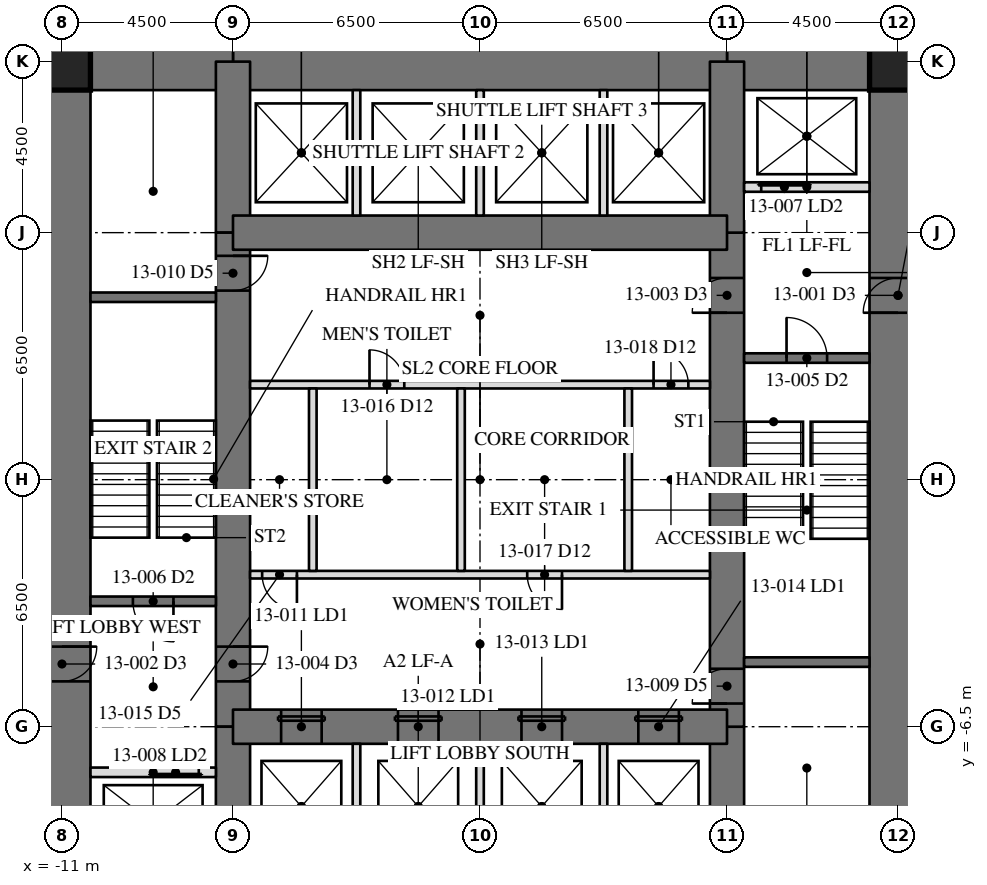
"""IFC4 building model, lengths in metres.
Left out: names, types, materials, properties, quantities, classifications, styles, units other than length and angle.
Written with IfcOpenShell. Run it as: python <this file> out.ifc"""

import sys

from ifc_helpers import new_model, si_unit, direction, frame, frame_2d, origin, origin_2d, place, context, subcontext, project, spatial, rectangle, hollow_rectangle, extrude, element, fill, save


model = new_model("IFC4")
c1 = context("Model", 3, precision=1e-05, world=origin(), true_north=direction((0.0, 1.0)))
c2 = subcontext(c1, "Body", "Model", "MODEL_VIEW")
j1 = project(units=[si_unit("LENGTHUNIT", "METRE"), si_unit("PLANEANGLEUNIT", "RADIAN")], contexts=[c1])
p1 = place(None, origin())
s1 = spatial("IfcSite", under=j1, at=p1, CompositionType="ELEMENT")
p2 = place(p1, origin())
s2 = spatial("IfcBuilding", under=s1, at=p2, CompositionType="ELEMENT")
p3 = place(p2, frame((0.0, 0.0, 57.0)))
s3 = spatial("IfcBuildingStorey", under=s2, at=p3, CompositionType="ELEMENT", Elevation=57.0)
p4 = place(p3, frame((11.0, -11.0, 0.0), z_axis=(0.0, 0.0, 1.0), x_axis=(0.0, 1.0, 0.0)))
e1 = element("IfcWall", 1, at=p4, inside=s3, PredefinedType="SHEAR", context=c2, shape_type="SweptSolid", body=[
    extrude(rectangle(XDim=22.0, YDim=1.5, at=frame_2d((11.0, 0.0))), origin(), (0.0, 0.0, 1.0), 4.1),
])
p5 = place(p4, frame((15.393, 0.0, 0.0)))
e2 = element("IfcOpeningElement", 2, at=p5, cuts=e1, PredefinedType="OPENING", context=c2, shape_type="SweptSolid", body=[
    extrude(rectangle(XDim=0.915, YDim=2.134, at=frame_2d((0.458, 1.067))), frame((0.0, 0.76, 0.0), z_axis=(0.0, -1.0, 0.0), x_axis=(1.0, 0.0, 0.0)), (0.0, 0.0, 1.0), 1.52),
])
p6 = place(p3, frame((-11.0, 11.0, 0.0), z_axis=(0.0, 0.0, 1.0), x_axis=(0.0, -1.0, 0.0)))
e3 = element("IfcWall", 3, at=p6, inside=s3, PredefinedType="SHEAR", context=c2, shape_type="SweptSolid", body=[
    extrude(rectangle(XDim=22.0, YDim=1.5, at=frame_2d((11.0, 0.0))), origin(), (0.0, 0.0, 1.0), 4.1),
])
p7 = place(p6, frame((15.393, 0.0, 0.0)))
e4 = element("IfcOpeningElement", 4, at=p7, cuts=e3, PredefinedType="OPENING", context=c2, shape_type="SweptSolid", body=[
    extrude(rectangle(XDim=0.915, YDim=2.134, at=frame_2d((0.458, 1.067))), frame((0.0, 0.76, 0.0), z_axis=(0.0, -1.0, 0.0), x_axis=(1.0, 0.0, 0.0)), (0.0, 0.0, 1.0), 1.52),
])
p8 = place(p3, frame((11.0, 11.0, 0.0), z_axis=(0.0, 0.0, 1.0), x_axis=(-1.0, 0.0, 0.0)))
e5 = element("IfcWall", 5, at=p8, inside=s3, PredefinedType="SHEAR", context=c2, shape_type="SweptSolid", body=[
    extrude(rectangle(XDim=4.5, YDim=1.5, at=frame_2d((2.25, 0.0))), origin(), (0.0, 0.0, 1.0), 4.1),
])
p9 = place(p3, frame((6.5, 11.0, 0.0), z_axis=(0.0, 0.0, 1.0), x_axis=(-1.0, 0.0, 0.0)))
e6 = element("IfcWall", 6, at=p9, inside=s3, PredefinedType="SHEAR", context=c2, shape_type="SweptSolid", body=[
    extrude(rectangle(XDim=13.0, YDim=1.5, at=frame_2d((6.5, 0.0))), origin(), (0.0, 0.0, 1.0), 4.1),
])
p10 = place(p3, frame((-6.5, 11.0, 0.0), z_axis=(0.0, 0.0, 1.0), x_axis=(-1.0, 0.0, 0.0)))
e7 = element("IfcWall", 7, at=p10, inside=s3, PredefinedType="SHEAR", context=c2, shape_type="SweptSolid", body=[
    extrude(rectangle(XDim=4.5, YDim=1.5, at=frame_2d((2.25, 0.0))), origin(), (0.0, 0.0, 1.0), 4.1),
])
p11 = place(p3, frame((6.5, -11.0, 0.0), z_axis=(0.0, 0.0, 1.0), x_axis=(0.0, 1.0, 0.0)))
e8 = element("IfcWall", 8, at=p11, inside=s3, PredefinedType="SHEAR", context=c2, shape_type="SweptSolid", body=[
    extrude(rectangle(XDim=4.5, YDim=0.9, at=frame_2d((2.25, 0.0))), origin(), (0.0, 0.0, 1.0), 4.1),
])
p12 = place(p3, frame((6.5, -6.5, 0.0), z_axis=(0.0, 0.0, 1.0), x_axis=(0.0, 1.0, 0.0)))
e9 = element("IfcWall", 9, at=p12, inside=s3, PredefinedType="SHEAR", context=c2, shape_type="SweptSolid", body=[
    extrude(rectangle(XDim=13.0, YDim=0.9, at=frame_2d((6.5, 0.0))), origin(), (0.0, 0.0, 1.0), 4.1),
])
p13 = place(p12, frame((10.893, 0.0, 0.0)))
e10 = element("IfcOpeningElement", 10, at=p13, cuts=e9, PredefinedType="OPENING", context=c2, shape_type="SweptSolid", body=[
    extrude(rectangle(XDim=0.915, YDim=2.134, at=frame_2d((0.458, 1.067))), frame((0.0, 0.46, 0.0), z_axis=(0.0, -1.0, 0.0), x_axis=(1.0, 0.0, 0.0)), (0.0, 0.0, 1.0), 0.92),
])
p14 = place(p12, frame((0.61, 0.0, 0.0)))
e11 = element("IfcOpeningElement", 11, at=p14, cuts=e9, PredefinedType="OPENING", context=c2, shape_type="SweptSolid", body=[
    extrude(rectangle(XDim=0.915, YDim=2.134, at=frame_2d((0.458, 1.067))), frame((0.0, 0.46, 0.0), z_axis=(0.0, -1.0, 0.0), x_axis=(1.0, 0.0, 0.0)), (0.0, 0.0, 1.0), 0.92),
])
for number, where, z_axis, x_axis in (
    (12, (6.5, 6.5, 0.0), (0.0, 0.0, 1.0), (0.0, 1.0, 0.0)),
    (13, (-6.5, 11.0, 0.0), (0.0, 0.0, 1.0), (0.0, -1.0, 0.0)),
):
    element("IfcWall", number, at=place(p3, frame(where, z_axis=z_axis, x_axis=x_axis)), inside=s3, PredefinedType="SHEAR", context=c2, shape_type="SweptSolid", body=[
        extrude(rectangle(XDim=4.5, YDim=0.9, at=frame_2d((2.25, 0.0))), origin(), (0.0, 0.0, 1.0), 4.1),
    ])
p15 = place(p3, frame((-6.5, 6.5, 0.0), z_axis=(0.0, 0.0, 1.0), x_axis=(0.0, -1.0, 0.0)))
e14 = element("IfcWall", 14, at=p15, inside=s3, PredefinedType="SHEAR", context=c2, shape_type="SweptSolid", body=[
    extrude(rectangle(XDim=13.0, YDim=0.9, at=frame_2d((6.5, 0.0))), origin(), (0.0, 0.0, 1.0), 4.1),
])
p16 = place(p15, frame((10.893, 0.0, 0.0)))
e15 = element("IfcOpeningElement", 15, at=p16, cuts=e14, PredefinedType="OPENING", context=c2, shape_type="SweptSolid", body=[
    extrude(rectangle(XDim=0.915, YDim=2.134, at=frame_2d((0.458, 1.067))), frame((0.0, 0.46, 0.0), z_axis=(0.0, -1.0, 0.0), x_axis=(1.0, 0.0, 0.0)), (0.0, 0.0, 1.0), 0.92),
])
p17 = place(p15, frame((0.61, 0.0, 0.0)))
e16 = element("IfcOpeningElement", 16, at=p17, cuts=e14, PredefinedType="OPENING", context=c2, shape_type="SweptSolid", body=[
    extrude(rectangle(XDim=0.915, YDim=2.134, at=frame_2d((0.458, 1.067))), frame((0.0, 0.46, 0.0), z_axis=(0.0, -1.0, 0.0), x_axis=(1.0, 0.0, 0.0)), (0.0, 0.0, 1.0), 0.92),
])
p18 = place(p3, frame((-6.5, -6.5, 0.0), z_axis=(0.0, 0.0, 1.0), x_axis=(0.0, -1.0, 0.0)))
e17 = element("IfcWall", 17, at=p18, inside=s3, PredefinedType="SHEAR", context=c2, shape_type="SweptSolid", body=[
    extrude(rectangle(XDim=4.5, YDim=0.9, at=frame_2d((2.25, 0.0))), origin(), (0.0, 0.0, 1.0), 4.1),
])
p19 = place(p3, frame((6.5, 6.5, 0.0), z_axis=(0.0, 0.0, 1.0), x_axis=(-1.0, 0.0, 0.0)))
e18 = element("IfcWall", 18, at=p19, inside=s3, PredefinedType="SHEAR", context=c2, shape_type="SweptSolid", body=[
    extrude(rectangle(XDim=13.0, YDim=0.9, at=frame_2d((6.5, 0.0))), origin(), (0.0, 0.0, 1.0), 4.1),
])
p20 = place(p3, frame((-6.5, -6.5, 0.0), z_axis=(0.0, 0.0, 1.0), x_axis=(1.0, 0.0, 0.0)))
e19 = element("IfcWall", 19, at=p20, inside=s3, PredefinedType="SHEAR", context=c2, shape_type="SweptSolid", body=[
    extrude(rectangle(XDim=13.0, YDim=0.9, at=frame_2d((6.5, 0.0))), origin(), (0.0, 0.0, 1.0), 4.1),
])
p21 = place(p20, frame((1.267, 0.0, 0.0)))
e20 = element("IfcOpeningElement", 20, at=p21, cuts=e19, PredefinedType="OPENING", context=c2, shape_type="SweptSolid", body=[
    extrude(rectangle(XDim=1.067, YDim=2.134, at=frame_2d((0.533, 1.067))), frame((0.0, 0.46, 0.0), z_axis=(0.0, -1.0, 0.0), x_axis=(1.0, 0.0, 0.0)), (0.0, 0.0, 1.0), 0.92),
])
p22 = place(p20, frame((4.342, 0.0, 0.0)))
e21 = element("IfcOpeningElement", 21, at=p22, cuts=e19, PredefinedType="OPENING", context=c2, shape_type="SweptSolid", body=[
    extrude(rectangle(XDim=1.067, YDim=2.134, at=frame_2d((0.533, 1.067))), frame((0.0, 0.46, 0.0), z_axis=(0.0, -1.0, 0.0), x_axis=(1.0, 0.0, 0.0)), (0.0, 0.0, 1.0), 0.92),
])
p23 = place(p20, frame((7.592, 0.0, 0.0)))
e22 = element("IfcOpeningElement", 22, at=p23, cuts=e19, PredefinedType="OPENING", context=c2, shape_type="SweptSolid", body=[
    extrude(rectangle(XDim=1.067, YDim=2.134, at=frame_2d((0.533, 1.067))), frame((0.0, 0.46, 0.0), z_axis=(0.0, -1.0, 0.0), x_axis=(1.0, 0.0, 0.0)), (0.0, 0.0, 1.0), 0.92),
])
p24 = place(p20, frame((10.667, 0.0, 0.0)))
e23 = element("IfcOpeningElement", 23, at=p24, cuts=e19, PredefinedType="OPENING", context=c2, shape_type="SweptSolid", body=[
    extrude(rectangle(XDim=1.067, YDim=2.134, at=frame_2d((0.533, 1.067))), frame((0.0, 0.46, 0.0), z_axis=(0.0, -1.0, 0.0), x_axis=(1.0, 0.0, 0.0)), (0.0, 0.0, 1.0), 0.92),
])
for number, where, z_axis, x_axis in (
    (24, (11.0, 11.0, 0.0), (0.0, 0.0, 1.0), (1.0, 0.0, 0.0)),
    (25, (-11.0, 11.0, 0.0), (0.0, 0.0, 1.0), (1.0, 0.0, 0.0)),
):
    element("IfcColumn", number, at=place(p3, frame(where, z_axis=z_axis, x_axis=x_axis)), inside=s3, PredefinedType="COLUMN", context=c2, shape_type="SweptSolid", body=[
        extrude(hollow_rectangle(XDim=1.499, YDim=1.499, WallThickness=0.102, at=origin_2d()), origin(), (0.0, 0.0, 1.0), 4.1),
    ])
for number, where, z_axis, x_axis in (
    (26, (6.95, -4.8, 0.0), (0.0, 0.0, 1.0), (1.0, 0.0, 0.0)),
    (27, (-6.95, 4.8, 0.0), (0.0, 0.0, 1.0), (-1.0, 0.0, 0.0)),
):
    element("IfcWall", number, at=place(p3, frame(where, z_axis=z_axis, x_axis=x_axis)), inside=s3, PredefinedType="SOLIDWALL", context=c2, shape_type="SweptSolid", body=[
        extrude(rectangle(XDim=3.3, YDim=0.25, at=frame_2d((1.65, 0.0))), origin(), (0.0, 0.0, 1.0), 3.91),
    ])
p25 = place(p3, frame((6.95, 3.2, 0.0), z_axis=(0.0, 0.0, 1.0), x_axis=(1.0, 0.0, 0.0)))
e28 = element("IfcWall", 28, at=p25, inside=s3, PredefinedType="SOLIDWALL", context=c2, shape_type="SweptSolid", body=[
    extrude(rectangle(XDim=3.3, YDim=0.25, at=frame_2d((1.65, 0.0))), origin(), (0.0, 0.0, 1.0), 3.91),
])
p26 = place(p25, frame((1.116, 0.0, 0.0)))
e29 = element("IfcOpeningElement", 29, at=p26, cuts=e28, PredefinedType="OPENING", context=c2, shape_type="SweptSolid", body=[
    extrude(rectangle(XDim=1.067, YDim=2.134, at=frame_2d((0.533, 1.067))), frame((0.0, 0.135, 0.0), z_axis=(0.0, -1.0, 0.0), x_axis=(1.0, 0.0, 0.0)), (0.0, 0.0, 1.0), 0.27),
])
p27 = place(p3, frame((-6.95, -3.2, 0.0), z_axis=(0.0, 0.0, 1.0), x_axis=(-1.0, 0.0, 0.0)))
e30 = element("IfcWall", 30, at=p27, inside=s3, PredefinedType="SOLIDWALL", context=c2, shape_type="SweptSolid", body=[
    extrude(rectangle(XDim=3.3, YDim=0.25, at=frame_2d((1.65, 0.0))), origin(), (0.0, 0.0, 1.0), 3.91),
])
p28 = place(p27, frame((1.116, 0.0, 0.0)))
e31 = element("IfcOpeningElement", 31, at=p28, cuts=e30, PredefinedType="OPENING", context=c2, shape_type="SweptSolid", body=[
    extrude(rectangle(XDim=1.067, YDim=2.134, at=frame_2d((0.533, 1.067))), frame((0.0, 0.135, 0.0), z_axis=(0.0, -1.0, 0.0), x_axis=(1.0, 0.0, 0.0)), (0.0, 0.0, 1.0), 0.27),
])
p29 = place(p3, frame((6.95, 7.7, 0.0), z_axis=(0.0, 0.0, 1.0), x_axis=(1.0, 0.0, 0.0)))
e32 = element("IfcWall", 32, at=p29, inside=s3, PredefinedType="PARTITIONING", context=c2, shape_type="SweptSolid", body=[
    extrude(rectangle(XDim=3.3, YDim=0.25, at=frame_2d((1.65, 0.0))), origin(), (0.0, 0.0, 1.0), 3.91),
])
p30 = place(p29, frame((0.45, 0.0, 0.0)))
e33 = element("IfcOpeningElement", 33, at=p30, cuts=e32, PredefinedType="OPENING", context=c2, shape_type="SweptSolid", body=[
    extrude(rectangle(XDim=1.219, YDim=2.134, at=frame_2d((0.609, 1.067))), frame((0.0, 0.135, 0.0), z_axis=(0.0, -1.0, 0.0), x_axis=(1.0, 0.0, 0.0)), (0.0, 0.0, 1.0), 0.27),
])
p31 = place(p3, frame((-6.95, -7.7, 0.0), z_axis=(0.0, 0.0, 1.0), x_axis=(-1.0, 0.0, 0.0)))
e34 = element("IfcWall", 34, at=p31, inside=s3, PredefinedType="PARTITIONING", context=c2, shape_type="SweptSolid", body=[
    extrude(rectangle(XDim=3.3, YDim=0.25, at=frame_2d((1.65, 0.0))), origin(), (0.0, 0.0, 1.0), 3.91),
])
p32 = place(p31, frame((0.45, 0.0, 0.0)))
e35 = element("IfcOpeningElement", 35, at=p32, cuts=e34, PredefinedType="OPENING", context=c2, shape_type="SweptSolid", body=[
    extrude(rectangle(XDim=1.219, YDim=2.134, at=frame_2d((0.609, 1.067))), frame((0.0, 0.135, 0.0), z_axis=(0.0, -1.0, 0.0), x_axis=(1.0, 0.0, 0.0)), (0.0, 0.0, 1.0), 0.27),
])
p33 = place(p3, frame((-6.05, 2.5, 0.0), z_axis=(0.0, 0.0, 1.0), x_axis=(1.0, 0.0, 0.0)))
e36 = element("IfcWall", 36, at=p33, inside=s3, PredefinedType="PARTITIONING", context=c2, shape_type="SweptSolid", body=[
    extrude(rectangle(XDim=12.1, YDim=0.2, at=frame_2d((6.05, 0.0))), origin(), (0.0, 0.0, 1.0), 3.91),
])
p34 = place(p33, frame((3.143, 0.0, 0.0)))
e37 = element("IfcOpeningElement", 37, at=p34, cuts=e36, PredefinedType="OPENING", context=c2, shape_type="SweptSolid", body=[
    extrude(rectangle(XDim=0.915, YDim=2.134, at=frame_2d((0.458, 1.067))), frame((0.0, 0.11, 0.0), z_axis=(0.0, -1.0, 0.0), x_axis=(1.0, 0.0, 0.0)), (0.0, 0.0, 1.0), 0.22),
])
p35 = place(p33, frame((10.617, 0.0, 0.0)))
e38 = element("IfcOpeningElement", 38, at=p35, cuts=e36, PredefinedType="OPENING", context=c2, shape_type="SweptSolid", body=[
    extrude(rectangle(XDim=0.915, YDim=2.134, at=frame_2d((0.458, 1.067))), frame((0.0, 0.11, 0.0), z_axis=(0.0, -1.0, 0.0), x_axis=(1.0, 0.0, 0.0)), (0.0, 0.0, 1.0), 0.22),
])
p36 = place(p3, frame((6.05, -2.5, 0.0), z_axis=(0.0, 0.0, 1.0), x_axis=(-1.0, 0.0, 0.0)))
e39 = element("IfcWall", 39, at=p36, inside=s3, PredefinedType="PARTITIONING", context=c2, shape_type="SweptSolid", body=[
    extrude(rectangle(XDim=12.1, YDim=0.2, at=frame_2d((6.05, 0.0))), origin(), (0.0, 0.0, 1.0), 3.91),
])
p37 = place(p36, frame((10.867, 0.0, 0.0)))
e40 = element("IfcOpeningElement", 40, at=p37, cuts=e39, PredefinedType="OPENING", context=c2, shape_type="SweptSolid", body=[
    extrude(rectangle(XDim=0.915, YDim=2.134, at=frame_2d((0.458, 1.067))), frame((0.0, 0.11, 0.0), z_axis=(0.0, -1.0, 0.0), x_axis=(1.0, 0.0, 0.0)), (0.0, 0.0, 1.0), 0.22),
])
p38 = place(p36, frame((3.893, 0.0, 0.0)))
e41 = element("IfcOpeningElement", 41, at=p38, cuts=e39, PredefinedType="OPENING", context=c2, shape_type="SweptSolid", body=[
    extrude(rectangle(XDim=0.915, YDim=2.134, at=frame_2d((0.458, 1.067))), frame((0.0, 0.11, 0.0), z_axis=(0.0, -1.0, 0.0), x_axis=(1.0, 0.0, 0.0)), (0.0, 0.0, 1.0), 0.22),
])
for number, where, z_axis, x_axis in (
    (42, (-3.25, 6.95, 0.0), (0.0, 0.0, 1.0), (0.0, 1.0, 0.0)),
    (43, (0.0, 6.95, 0.0), (0.0, 0.0, 1.0), (0.0, 1.0, 0.0)),
    (44, (3.25, 6.95, 0.0), (0.0, 0.0, 1.0), (0.0, 1.0, 0.0)),
    (45, (-3.25, -10.25, 0.0), (0.0, 0.0, 1.0), (0.0, 1.0, 0.0)),
    (46, (0.0, -10.25, 0.0), (0.0, 0.0, 1.0), (0.0, 1.0, 0.0)),
    (47, (3.25, -10.25, 0.0), (0.0, 0.0, 1.0), (0.0, 1.0, 0.0)),
):
    element("IfcWall", number, at=place(p3, frame(where, z_axis=z_axis, x_axis=x_axis)), inside=s3, PredefinedType="PARTITIONING", context=c2, shape_type="SweptSolid", body=[
        extrude(rectangle(XDim=3.3, YDim=0.2, at=frame_2d((1.65, 0.0))), origin(), (0.0, 0.0, 1.0), 3.91),
    ])
for number, where, z_axis, x_axis in (
    (48, (-4.4, -2.4, 0.0), (0.0, 0.0, 1.0), (0.0, 1.0, 0.0)),
    (49, (-0.5, -2.4, 0.0), (0.0, 0.0, 1.0), (0.0, 1.0, 0.0)),
    (50, (3.9, -2.4, 0.0), (0.0, 0.0, 1.0), (0.0, 1.0, 0.0)),
):
    element("IfcWall", number, at=place(p3, frame(where, z_axis=z_axis, x_axis=x_axis)), inside=s3, PredefinedType="PARTITIONING", context=c2, shape_type="SweptSolid", body=[
        extrude(rectangle(XDim=4.8, YDim=0.2, at=frame_2d((2.4, 0.0))), origin(), (0.0, 0.0, 1.0), 3.91),
    ])
p39 = place(p13, origin())
e51 = element("IfcDoor", 51, at=p39, inside=s3, OperationType="SINGLE_SWING_RIGHT", PredefinedType="DOOR", context=c2, shape_type="SweptSolid", body=[
    extrude(rectangle(XDim=0.915, YDim=2.134, at=frame_2d((0.458, 1.067))), frame((0.0, -0.375, 0.0), z_axis=(0.0, -1.0, 0.0), x_axis=(1.0, 0.0, 0.0)), (0.0, 0.0, 1.0), 0.05),
])
fill(e10, e51)
p40 = place(p16, origin())
e52 = element("IfcDoor", 52, at=p40, inside=s3, OperationType="SINGLE_SWING_RIGHT", PredefinedType="DOOR", context=c2, shape_type="SweptSolid", body=[
    extrude(rectangle(XDim=0.915, YDim=2.134, at=frame_2d((0.458, 1.067))), frame((0.0, -0.375, 0.0), z_axis=(0.0, -1.0, 0.0), x_axis=(1.0, 0.0, 0.0)), (0.0, 0.0, 1.0), 0.05),
])
fill(e15, e52)
p41 = place(p26, origin())
e53 = element("IfcDoor", 53, at=p41, inside=s3, OperationType="SINGLE_SWING_LEFT", PredefinedType="DOOR", context=c2, shape_type="SweptSolid", body=[
    extrude(rectangle(XDim=1.067, YDim=2.134, at=frame_2d((0.533, 1.067))), frame((0.0, 0.025, 0.0), z_axis=(0.0, -1.0, 0.0), x_axis=(1.0, 0.0, 0.0)), (0.0, 0.0, 1.0), 0.05),
])
fill(e29, e53)
p42 = place(p28, origin())
e54 = element("IfcDoor", 54, at=p42, inside=s3, OperationType="SINGLE_SWING_LEFT", PredefinedType="DOOR", context=c2, shape_type="SweptSolid", body=[
    extrude(rectangle(XDim=1.067, YDim=2.134, at=frame_2d((0.533, 1.067))), frame((0.0, 0.025, 0.0), z_axis=(0.0, -1.0, 0.0), x_axis=(1.0, 0.0, 0.0)), (0.0, 0.0, 1.0), 0.05),
])
fill(e31, e54)
p43 = place(p30, origin())
e55 = element("IfcDoor", 55, at=p43, inside=s3, OperationType="SLIDING_TO_LEFT", PredefinedType="DOOR", context=c2, shape_type="SweptSolid", body=[
    extrude(rectangle(XDim=1.219, YDim=2.134, at=frame_2d((0.609, 1.067))), frame((0.0, 0.025, 0.0), z_axis=(0.0, -1.0, 0.0), x_axis=(1.0, 0.0, 0.0)), (0.0, 0.0, 1.0), 0.05),
])
fill(e33, e55)
p44 = place(p32, origin())
e56 = element("IfcDoor", 56, at=p44, inside=s3, OperationType="SLIDING_TO_LEFT", PredefinedType="DOOR", context=c2, shape_type="SweptSolid", body=[
    extrude(rectangle(XDim=1.219, YDim=2.134, at=frame_2d((0.609, 1.067))), frame((0.0, 0.025, 0.0), z_axis=(0.0, -1.0, 0.0), x_axis=(1.0, 0.0, 0.0)), (0.0, 0.0, 1.0), 0.05),
])
fill(e35, e56)
p45 = place(p14, origin())
e57 = element("IfcDoor", 57, at=p45, inside=s3, OperationType="SINGLE_SWING_RIGHT", PredefinedType="DOOR", context=c2, shape_type="SweptSolid", body=[
    extrude(rectangle(XDim=0.915, YDim=2.134, at=frame_2d((0.458, 1.067))), frame((0.0, -0.375, 0.0), z_axis=(0.0, -1.0, 0.0), x_axis=(1.0, 0.0, 0.0)), (0.0, 0.0, 1.0), 0.05),
])
fill(e11, e57)
p46 = place(p17, origin())
e58 = element("IfcDoor", 58, at=p46, inside=s3, OperationType="SINGLE_SWING_RIGHT", PredefinedType="DOOR", context=c2, shape_type="SweptSolid", body=[
    extrude(rectangle(XDim=0.915, YDim=2.134, at=frame_2d((0.458, 1.067))), frame((0.0, -0.375, 0.0), z_axis=(0.0, -1.0, 0.0), x_axis=(1.0, 0.0, 0.0)), (0.0, 0.0, 1.0), 0.05),
])
fill(e16, e58)
p47 = place(p21, origin())
e59 = element("IfcDoor", 59, at=p47, inside=s3, OperationType="SLIDING_TO_LEFT", PredefinedType="DOOR", context=c2, shape_type="SweptSolid", body=[
    extrude(rectangle(XDim=1.067, YDim=2.134, at=frame_2d((0.533, 1.067))), frame((0.0, -0.375, 0.0), z_axis=(0.0, -1.0, 0.0), x_axis=(1.0, 0.0, 0.0)), (0.0, 0.0, 1.0), 0.05),
])
fill(e20, e59)
p48 = place(p22, origin())
e60 = element("IfcDoor", 60, at=p48, inside=s3, OperationType="SLIDING_TO_LEFT", PredefinedType="DOOR", context=c2, shape_type="SweptSolid", body=[
    extrude(rectangle(XDim=1.067, YDim=2.134, at=frame_2d((0.533, 1.067))), frame((0.0, -0.375, 0.0), z_axis=(0.0, -1.0, 0.0), x_axis=(1.0, 0.0, 0.0)), (0.0, 0.0, 1.0), 0.05),
])
fill(e21, e60)
p49 = place(p23, origin())
e61 = element("IfcDoor", 61, at=p49, inside=s3, OperationType="SLIDING_TO_LEFT", PredefinedType="DOOR", context=c2, shape_type="SweptSolid", body=[
    extrude(rectangle(XDim=1.067, YDim=2.134, at=frame_2d((0.533, 1.067))), frame((0.0, -0.375, 0.0), z_axis=(0.0, -1.0, 0.0), x_axis=(1.0, 0.0, 0.0)), (0.0, 0.0, 1.0), 0.05),
])
fill(e22, e61)
p50 = place(p24, origin())
e62 = element("IfcDoor", 62, at=p50, inside=s3, OperationType="SLIDING_TO_LEFT", PredefinedType="DOOR", context=c2, shape_type="SweptSolid", body=[
    extrude(rectangle(XDim=1.067, YDim=2.134, at=frame_2d((0.533, 1.067))), frame((0.0, -0.375, 0.0), z_axis=(0.0, -1.0, 0.0), x_axis=(1.0, 0.0, 0.0)), (0.0, 0.0, 1.0), 0.05),
])
fill(e23, e62)
p51 = place(p37, origin())
e63 = element("IfcDoor", 63, at=p51, inside=s3, OperationType="SINGLE_SWING_RIGHT", PredefinedType="DOOR", context=c2, shape_type="SweptSolid", body=[
    extrude(rectangle(XDim=0.915, YDim=2.134, at=frame_2d((0.458, 1.067))), frame((0.0, 0.025, 0.0), z_axis=(0.0, -1.0, 0.0), x_axis=(1.0, 0.0, 0.0)), (0.0, 0.0, 1.0), 0.05),
])
fill(e40, e63)
p52 = place(p34, origin())
e64 = element("IfcDoor", 64, at=p52, inside=s3, OperationType="SINGLE_SWING_LEFT", PredefinedType="DOOR", context=c2, shape_type="SweptSolid", body=[
    extrude(rectangle(XDim=0.915, YDim=2.134, at=frame_2d((0.458, 1.067))), frame((0.0, 0.025, 0.0), z_axis=(0.0, -1.0, 0.0), x_axis=(1.0, 0.0, 0.0)), (0.0, 0.0, 1.0), 0.05),
])
fill(e37, e64)
p53 = place(p38, origin())
e65 = element("IfcDoor", 65, at=p53, inside=s3, OperationType="SINGLE_SWING_LEFT", PredefinedType="DOOR", context=c2, shape_type="SweptSolid", body=[
    extrude(rectangle(XDim=0.915, YDim=2.134, at=frame_2d((0.458, 1.067))), frame((0.0, 0.025, 0.0), z_axis=(0.0, -1.0, 0.0), x_axis=(1.0, 0.0, 0.0)), (0.0, 0.0, 1.0), 0.05),
])
fill(e41, e65)
p54 = place(p35, origin())
e66 = element("IfcDoor", 66, at=p54, inside=s3, OperationType="SINGLE_SWING_LEFT", PredefinedType="DOOR", context=c2, shape_type="SweptSolid", body=[
    extrude(rectangle(XDim=0.915, YDim=2.134, at=frame_2d((0.458, 1.067))), frame((0.0, 0.025, 0.0), z_axis=(0.0, -1.0, 0.0), x_axis=(1.0, 0.0, 0.0)), (0.0, 0.0, 1.0), 0.05),
])
fill(e38, e66)
save(model, sys.argv[1])
